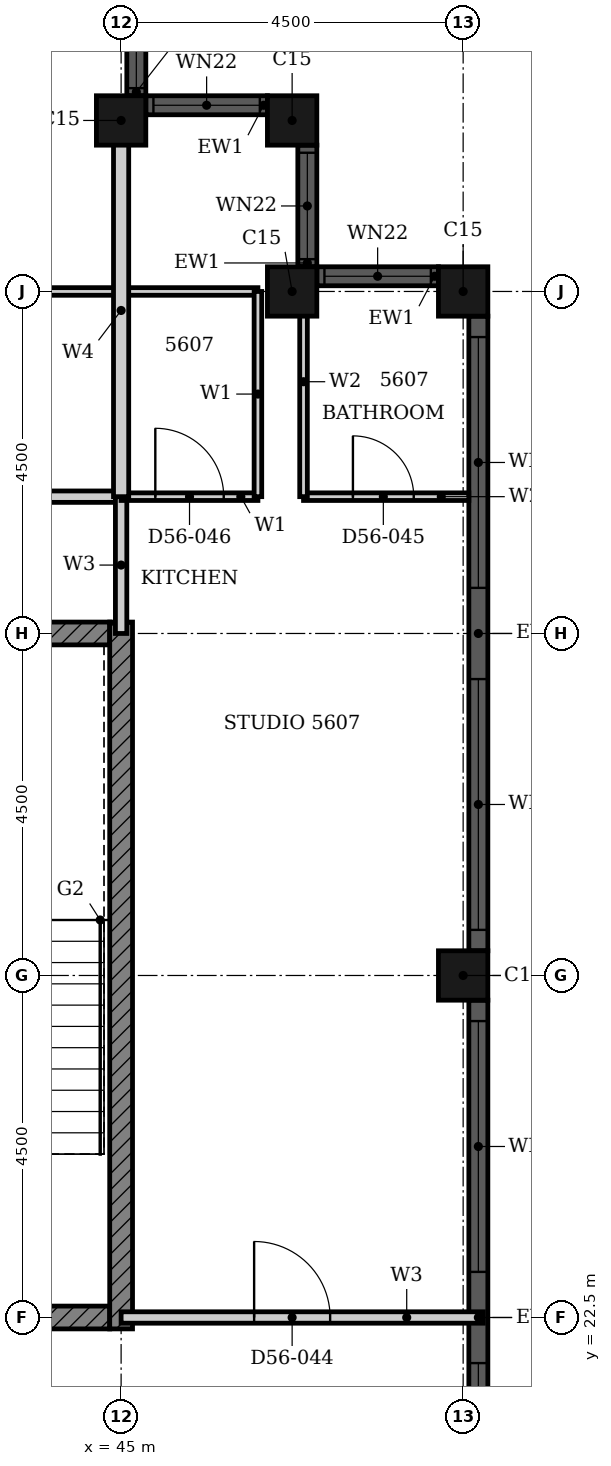
"""IFC4 building model, lengths in metres.
Left out: names, types, materials, properties, quantities, classifications, styles, units other than length and angle.
Written with IfcOpenShell. Run it as: python <this file> out.ifc"""

import sys

from ifc_helpers import new_model, si_unit, direction, frame, frame_2d, origin, origin_2d, place, context, subcontext, project, spatial, rectangle, hollow_rectangle, extrude, element, fill, save


model = new_model("IFC4")
c1 = context("Model", 3, precision=1e-05, world=origin(), true_north=direction((0.0, 1.0)))
c2 = subcontext(c1, "Body", "Model", "MODEL_VIEW")
j1 = project(units=[si_unit("LENGTHUNIT", "METRE"), si_unit("PLANEANGLEUNIT", "RADIAN")], contexts=[c1])
p1 = place(None, origin())
s1 = spatial("IfcSite", under=j1, at=p1, CompositionType="ELEMENT")
p2 = place(p1, origin())
s2 = spatial("IfcBuilding", under=s1, at=p2, CompositionType="ELEMENT")
p3 = place(p2, frame((0.0, 0.0, 222.0)))
s3 = spatial("IfcBuildingStorey", under=s2, at=p3, CompositionType="ELEMENT", Elevation=222.0)
for number, where, z_axis, x_axis in (
    (1, (49.5, 27.0, 0.0), (0.0, 0.0, 1.0), (1.0, 0.0, 0.0)),
    (2, (49.5, 36.0, 0.0), (0.0, 0.0, 1.0), (1.0, 0.0, 0.0)),
    (3, (47.25, 36.0, 0.0), (0.0, 0.0, 1.0), (1.0, 0.0, 0.0)),
    (4, (47.25, 38.25, 0.0), (0.0, 0.0, 1.0), (1.0, 0.0, 0.0)),
    (5, (45.0, 38.25, 0.0), (0.0, 0.0, 1.0), (1.0, 0.0, 0.0)),
):
    element("IfcColumn", number, at=place(p3, frame(where, z_axis=z_axis, x_axis=x_axis)), inside=s3, PredefinedType="COLUMN", context=c2, shape_type="SweptSolid", body=[
        extrude(hollow_rectangle(XDim=0.65, YDim=0.65, WallThickness=0.021, at=origin_2d()), origin(), (0.0, 0.0, 1.0), 3.7),
    ])
p4 = place(p3, frame((49.7, 18.325, 0.0), z_axis=(0.0, 0.0, 1.0), x_axis=(0.0, 1.0, 0.0)))
e6 = element("IfcWall", 6, at=p4, inside=s3, PredefinedType="SOLIDWALL", context=c2, shape_type="SweptSolid", body=[
    extrude(rectangle(XDim=8.35, YDim=0.25, at=frame_2d((4.175, 0.0))), origin(), (0.0, 0.0, 1.0), 3.7),
])
p5 = place(p4, frame((0.275, 0.0, 0.45)))
e7 = element("IfcOpeningElement", 7, at=p5, cuts=e6, PredefinedType="OPENING", context=c2, shape_type="SweptSolid", body=[
    extrude(rectangle(XDim=3.3, YDim=2.3, at=frame_2d((1.65, 1.15))), frame((0.0, 0.135, 0.0), z_axis=(0.0, -1.0, 0.0), x_axis=(1.0, 0.0, 0.0)), (0.0, 0.0, 1.0), 0.27),
])
p6 = place(p4, frame((4.775, 0.0, 0.45)))
e8 = element("IfcOpeningElement", 8, at=p6, cuts=e6, PredefinedType="OPENING", context=c2, shape_type="SweptSolid", body=[
    extrude(rectangle(XDim=3.3, YDim=2.3, at=frame_2d((1.65, 1.15))), frame((0.0, 0.135, 0.0), z_axis=(0.0, -1.0, 0.0), x_axis=(1.0, 0.0, 0.0)), (0.0, 0.0, 1.0), 0.27),
])
p7 = place(p3, frame((49.7, 27.325, 0.0), z_axis=(0.0, 0.0, 1.0), x_axis=(0.0, 1.0, 0.0)))
e9 = element("IfcWall", 9, at=p7, inside=s3, PredefinedType="SOLIDWALL", context=c2, shape_type="SweptSolid", body=[
    extrude(rectangle(XDim=8.35, YDim=0.25, at=frame_2d((4.175, 0.0))), origin(), (0.0, 0.0, 1.0), 3.7),
])
p8 = place(p7, frame((0.275, 0.0, 0.45)))
e10 = element("IfcOpeningElement", 10, at=p8, cuts=e9, PredefinedType="OPENING", context=c2, shape_type="SweptSolid", body=[
    extrude(rectangle(XDim=3.3, YDim=2.3, at=frame_2d((1.65, 1.15))), frame((0.0, 0.135, 0.0), z_axis=(0.0, -1.0, 0.0), x_axis=(1.0, 0.0, 0.0)), (0.0, 0.0, 1.0), 0.27),
])
p9 = place(p7, frame((4.775, 0.0, 0.45)))
e11 = element("IfcOpeningElement", 11, at=p9, cuts=e9, PredefinedType="OPENING", context=c2, shape_type="SweptSolid", body=[
    extrude(rectangle(XDim=3.3, YDim=2.3, at=frame_2d((1.65, 1.15))), frame((0.0, 0.135, 0.0), z_axis=(0.0, -1.0, 0.0), x_axis=(1.0, 0.0, 0.0)), (0.0, 0.0, 1.0), 0.27),
])
p10 = place(p3, frame((49.175, 36.2, 0.0), z_axis=(0.0, 0.0, 1.0), x_axis=(-1.0, 0.0, 0.0)))
e12 = element("IfcWall", 12, at=p10, inside=s3, PredefinedType="SOLIDWALL", context=c2, shape_type="SweptSolid", body=[
    extrude(rectangle(XDim=1.6, YDim=0.25, at=frame_2d((0.8, 0.0))), origin(), (0.0, 0.0, 1.0), 3.7),
])
p11 = place(p10, frame((0.1, 0.0, 0.9)))
e13 = element("IfcOpeningElement", 13, at=p11, cuts=e12, PredefinedType="OPENING", context=c2, shape_type="SweptSolid", body=[
    extrude(rectangle(XDim=1.4, YDim=1.85, at=frame_2d((0.7, 0.925))), frame((0.0, 0.135, 0.0), z_axis=(0.0, -1.0, 0.0), x_axis=(1.0, 0.0, 0.0)), (0.0, 0.0, 1.0), 0.27),
])
p12 = place(p3, frame((47.45, 36.325, 0.0), z_axis=(0.0, 0.0, 1.0), x_axis=(0.0, 1.0, 0.0)))
e14 = element("IfcWall", 14, at=p12, inside=s3, PredefinedType="SOLIDWALL", context=c2, shape_type="SweptSolid", body=[
    extrude(rectangle(XDim=1.6, YDim=0.25, at=frame_2d((0.8, 0.0))), origin(), (0.0, 0.0, 1.0), 3.7),
])
p13 = place(p12, frame((0.1, 0.0, 0.9)))
e15 = element("IfcOpeningElement", 15, at=p13, cuts=e14, PredefinedType="OPENING", context=c2, shape_type="SweptSolid", body=[
    extrude(rectangle(XDim=1.4, YDim=1.85, at=frame_2d((0.7, 0.925))), frame((0.0, 0.135, 0.0), z_axis=(0.0, -1.0, 0.0), x_axis=(1.0, 0.0, 0.0)), (0.0, 0.0, 1.0), 0.27),
])
p14 = place(p3, frame((46.925, 38.45, 0.0), z_axis=(0.0, 0.0, 1.0), x_axis=(-1.0, 0.0, 0.0)))
e16 = element("IfcWall", 16, at=p14, inside=s3, PredefinedType="SOLIDWALL", context=c2, shape_type="SweptSolid", body=[
    extrude(rectangle(XDim=1.6, YDim=0.25, at=frame_2d((0.8, 0.0))), origin(), (0.0, 0.0, 1.0), 3.7),
])
p15 = place(p14, frame((0.1, 0.0, 0.9)))
e17 = element("IfcOpeningElement", 17, at=p15, cuts=e16, PredefinedType="OPENING", context=c2, shape_type="SweptSolid", body=[
    extrude(rectangle(XDim=1.4, YDim=1.85, at=frame_2d((0.7, 0.925))), frame((0.0, 0.135, 0.0), z_axis=(0.0, -1.0, 0.0), x_axis=(1.0, 0.0, 0.0)), (0.0, 0.0, 1.0), 0.27),
])
p16 = place(p3, frame((45.2, 38.575, 0.0), z_axis=(0.0, 0.0, 1.0), x_axis=(0.0, 1.0, 0.0)))
e18 = element("IfcWall", 18, at=p16, inside=s3, PredefinedType="SOLIDWALL", context=c2, shape_type="SweptSolid", body=[
    extrude(rectangle(XDim=1.6, YDim=0.25, at=frame_2d((0.8, 0.0))), origin(), (0.0, 0.0, 1.0), 3.7),
])
p17 = place(p16, frame((0.1, 0.0, 0.9)))
e19 = element("IfcOpeningElement", 19, at=p17, cuts=e18, PredefinedType="OPENING", context=c2, shape_type="SweptSolid", body=[
    extrude(rectangle(XDim=1.4, YDim=1.85, at=frame_2d((0.7, 0.925))), frame((0.0, 0.135, 0.0), z_axis=(0.0, -1.0, 0.0), x_axis=(1.0, 0.0, 0.0)), (0.0, 0.0, 1.0), 0.27),
])
p18 = place(p3, frame((32.911, 22.5, 0.0), z_axis=(0.0, 0.0, 1.0), x_axis=(1.0, 0.0, 0.0)))
e20 = element("IfcWall", 20, at=p18, inside=s3, PredefinedType="SHEAR", context=c2, shape_type="SweptSolid", body=[
    extrude(rectangle(XDim=11.939, YDim=0.3, at=frame_2d((5.97, 0.0))), origin(), (0.0, 0.0, 1.0), 3.4),
])
p19 = place(p18, frame((5.404, 0.0, 0.0)))
e21 = element("IfcOpeningElement", 21, at=p19, cuts=e20, PredefinedType="OPENING", context=c2, shape_type="SweptSolid", body=[
    extrude(rectangle(XDim=1.8, YDim=2.1, at=frame_2d((0.9, 1.05))), frame((0.0, 0.16, 0.0), z_axis=(0.0, -1.0, 0.0), x_axis=(1.0, 0.0, 0.0)), (0.0, 0.0, 1.0), 0.32),
])
p20 = place(p3, frame((40.625, 31.5, 0.0), z_axis=(0.0, 0.0, 1.0), x_axis=(1.0, 0.0, 0.0)))
e22 = element("IfcWall", 22, at=p20, inside=s3, PredefinedType="SHEAR", context=c2, shape_type="SweptSolid", body=[
    extrude(rectangle(XDim=4.225, YDim=0.3, at=frame_2d((2.113, 0.0))), origin(), (0.0, 0.0, 1.0), 3.4),
])
p21 = place(p3, frame((45.0, 22.35, 0.0), z_axis=(0.0, 0.0, 1.0), x_axis=(0.0, 1.0, 0.0)))
e23 = element("IfcWall", 23, at=p21, inside=s3, PredefinedType="SHEAR", context=c2, shape_type="SweptSolid", body=[
    extrude(rectangle(XDim=9.3, YDim=0.3, at=frame_2d((4.65, 0.0))), origin(), (0.0, 0.0, 1.0), 3.4),
])
p22 = place(p3, frame((45.0, 22.5, 0.0), z_axis=(0.0, 0.0, 1.0), x_axis=(1.0, 0.0, 0.0)))
e24 = element("IfcWall", 24, at=p22, inside=s3, PredefinedType="PARTITIONING", context=c2, shape_type="SweptSolid", body=[
    extrude(rectangle(XDim=4.765, YDim=0.15, at=frame_2d((2.382, 0.0))), origin(), (0.0, 0.0, 1.0), 3.4),
])
p23 = place(p22, frame((1.75, 0.0, 0.0)))
e25 = element("IfcOpeningElement", 25, at=p23, cuts=e24, PredefinedType="OPENING", context=c2, shape_type="SweptSolid", body=[
    extrude(rectangle(XDim=1.0, YDim=2.2, at=frame_2d((0.5, 1.1))), frame((0.0, 0.085, 0.0), z_axis=(0.0, -1.0, 0.0), x_axis=(1.0, 0.0, 0.0)), (0.0, 0.0, 1.0), 0.17),
])
p24 = place(p3, frame((33.9, 33.3, 0.0), z_axis=(0.0, 0.0, 1.0), x_axis=(1.0, 0.0, 0.0)))
e26 = element("IfcWall", 26, at=p24, inside=s3, PredefinedType="PARTITIONING", context=c2, shape_type="SweptSolid", body=[
    extrude(rectangle(XDim=11.1, YDim=0.15, at=frame_2d((5.55, 0.0))), origin(), (0.0, 0.0, 1.0), 3.4),
])
p25 = place(p24, frame((1.6, 0.0, 0.0)))
e27 = element("IfcOpeningElement", 27, at=p25, cuts=e26, PredefinedType="OPENING", context=c2, shape_type="SweptSolid", body=[
    extrude(rectangle(XDim=1.0, YDim=2.2, at=frame_2d((0.5, 1.1))), frame((0.0, 0.085, 0.0), z_axis=(0.0, -1.0, 0.0), x_axis=(1.0, 0.0, 0.0)), (0.0, 0.0, 1.0), 0.17),
])
p26 = place(p3, frame((45.0, 31.5, 0.0), z_axis=(0.0, 0.0, 1.0), x_axis=(0.0, 1.0, 0.0)))
e28 = element("IfcWall", 28, at=p26, inside=s3, PredefinedType="PARTITIONING", context=c2, shape_type="SweptSolid", body=[
    extrude(rectangle(XDim=1.8, YDim=0.15, at=frame_2d((0.9, 0.0))), origin(), (0.0, 0.0, 1.0), 3.4),
])
p27 = place(p3, frame((45.0, 33.3, 0.0), z_axis=(0.0, 0.0, 1.0), x_axis=(1.0, 0.0, 0.0)))
e29 = element("IfcWall", 29, at=p27, inside=s3, PredefinedType="PARTITIONING", context=c2, shape_type="SweptSolid", body=[
    extrude(rectangle(XDim=1.8, YDim=0.1, at=frame_2d((0.9, 0.0))), origin(), (0.0, 0.0, 1.0), 3.4),
])
p28 = place(p27, frame((0.45, 0.0, 0.0)))
e30 = element("IfcOpeningElement", 30, at=p28, cuts=e29, PredefinedType="OPENING", context=c2, shape_type="SweptSolid", body=[
    extrude(rectangle(XDim=0.9, YDim=2.1, at=frame_2d((0.45, 1.05))), frame((0.0, 0.06, 0.0), z_axis=(0.0, -1.0, 0.0), x_axis=(1.0, 0.0, 0.0)), (0.0, 0.0, 1.0), 0.12),
])
p29 = place(p3, frame((38.1, 36.0, 0.0), z_axis=(0.0, 0.0, 1.0), x_axis=(1.0, 0.0, 0.0)))
e31 = element("IfcWall", 31, at=p29, inside=s3, PredefinedType="PARTITIONING", context=c2, shape_type="SweptSolid", body=[
    extrude(rectangle(XDim=8.7, YDim=0.1, at=frame_2d((4.35, 0.0))), origin(), (0.0, 0.0, 1.0), 3.4),
])
p30 = place(p29, frame((4.65, 0.0, 0.0)))
e32 = element("IfcOpeningElement", 32, at=p30, cuts=e31, PredefinedType="OPENING", context=c2, shape_type="SweptSolid", body=[
    extrude(rectangle(XDim=0.9, YDim=2.1, at=frame_2d((0.45, 1.05))), frame((0.0, 0.06, 0.0), z_axis=(0.0, -1.0, 0.0), x_axis=(1.0, 0.0, 0.0)), (0.0, 0.0, 1.0), 0.12),
])
p31 = place(p3, frame((46.8, 33.3, 0.0), z_axis=(0.0, 0.0, 1.0), x_axis=(0.0, 1.0, 0.0)))
e33 = element("IfcWall", 33, at=p31, inside=s3, PredefinedType="PARTITIONING", context=c2, shape_type="SweptSolid", body=[
    extrude(rectangle(XDim=2.7, YDim=0.1, at=frame_2d((1.35, 0.0))), origin(), (0.0, 0.0, 1.0), 3.4),
])
p32 = place(p3, frame((45.0, 33.3, 0.0), z_axis=(0.0, 0.0, 1.0), x_axis=(0.0, 1.0, 0.0)))
e34 = element("IfcWall", 34, at=p32, inside=s3, PredefinedType="PARTITIONING", context=c2, shape_type="SweptSolid", body=[
    extrude(rectangle(XDim=4.9, YDim=0.2, at=frame_2d((2.45, 0.0))), origin(), (0.0, 0.0, 1.0), 3.4),
])
p33 = place(p3, frame((47.4, 33.3, 0.0), z_axis=(0.0, 0.0, 1.0), x_axis=(1.0, 0.0, 0.0)))
e35 = element("IfcWall", 35, at=p33, inside=s3, PredefinedType="PARTITIONING", context=c2, shape_type="SweptSolid", body=[
    extrude(rectangle(XDim=2.175, YDim=0.1, at=frame_2d((1.087, 0.0))), origin(), (0.0, 0.0, 1.0), 3.4),
])
p34 = place(p33, frame((0.65, 0.0, 0.0)))
e36 = element("IfcOpeningElement", 36, at=p34, cuts=e35, PredefinedType="OPENING", context=c2, shape_type="SweptSolid", body=[
    extrude(rectangle(XDim=0.8, YDim=2.1, at=frame_2d((0.4, 1.05))), frame((0.0, 0.06, 0.0), z_axis=(0.0, -1.0, 0.0), x_axis=(1.0, 0.0, 0.0)), (0.0, 0.0, 1.0), 0.12),
])
p35 = place(p3, frame((47.4, 33.3, 0.0), z_axis=(0.0, 0.0, 1.0), x_axis=(0.0, 1.0, 0.0)))
e37 = element("IfcWall", 37, at=p35, inside=s3, PredefinedType="PARTITIONING", context=c2, shape_type="SweptSolid", body=[
    extrude(rectangle(XDim=3.025, YDim=0.1, at=frame_2d((1.512, 0.0))), origin(), (0.0, 0.0, 1.0), 3.4),
])
p36 = place(p5, origin())
e38 = element("IfcWindow", 38, at=p36, inside=s3, PartitioningType="SINGLE_PANEL", PredefinedType="WINDOW", context=c2, shape_type="SweptSolid", body=[
    extrude(rectangle(XDim=3.3, YDim=2.3, at=frame_2d((1.65, 1.15))), frame((0.0, 0.03, 0.0), z_axis=(0.0, -1.0, 0.0), x_axis=(1.0, 0.0, 0.0)), (0.0, 0.0, 1.0), 0.06),
])
fill(e7, e38)
p37 = place(p6, origin())
e39 = element("IfcWindow", 39, at=p37, inside=s3, PartitioningType="SINGLE_PANEL", PredefinedType="WINDOW", context=c2, shape_type="SweptSolid", body=[
    extrude(rectangle(XDim=3.3, YDim=2.3, at=frame_2d((1.65, 1.15))), frame((0.0, 0.03, 0.0), z_axis=(0.0, -1.0, 0.0), x_axis=(1.0, 0.0, 0.0)), (0.0, 0.0, 1.0), 0.06),
])
fill(e8, e39)
p38 = place(p8, origin())
e40 = element("IfcWindow", 40, at=p38, inside=s3, PartitioningType="SINGLE_PANEL", PredefinedType="WINDOW", context=c2, shape_type="SweptSolid", body=[
    extrude(rectangle(XDim=3.3, YDim=2.3, at=frame_2d((1.65, 1.15))), frame((0.0, 0.03, 0.0), z_axis=(0.0, -1.0, 0.0), x_axis=(1.0, 0.0, 0.0)), (0.0, 0.0, 1.0), 0.06),
])
fill(e10, e40)
p39 = place(p9, origin())
e41 = element("IfcWindow", 41, at=p39, inside=s3, PartitioningType="SINGLE_PANEL", PredefinedType="WINDOW", context=c2, shape_type="SweptSolid", body=[
    extrude(rectangle(XDim=3.3, YDim=2.3, at=frame_2d((1.65, 1.15))), frame((0.0, 0.03, 0.0), z_axis=(0.0, -1.0, 0.0), x_axis=(1.0, 0.0, 0.0)), (0.0, 0.0, 1.0), 0.06),
])
fill(e11, e41)
p40 = place(p11, origin())
e42 = element("IfcWindow", 42, at=p40, inside=s3, PartitioningType="SINGLE_PANEL", PredefinedType="WINDOW", context=c2, shape_type="SweptSolid", body=[
    extrude(rectangle(XDim=1.4, YDim=1.85, at=frame_2d((0.7, 0.925))), frame((0.0, 0.03, 0.0), z_axis=(0.0, -1.0, 0.0), x_axis=(1.0, 0.0, 0.0)), (0.0, 0.0, 1.0), 0.06),
])
fill(e13, e42)
p41 = place(p13, origin())
e43 = element("IfcWindow", 43, at=p41, inside=s3, PartitioningType="SINGLE_PANEL", PredefinedType="WINDOW", context=c2, shape_type="SweptSolid", body=[
    extrude(rectangle(XDim=1.4, YDim=1.85, at=frame_2d((0.7, 0.925))), frame((0.0, 0.03, 0.0), z_axis=(0.0, -1.0, 0.0), x_axis=(1.0, 0.0, 0.0)), (0.0, 0.0, 1.0), 0.06),
])
fill(e15, e43)
p42 = place(p15, origin())
e44 = element("IfcWindow", 44, at=p42, inside=s3, PartitioningType="SINGLE_PANEL", PredefinedType="WINDOW", context=c2, shape_type="SweptSolid", body=[
    extrude(rectangle(XDim=1.4, YDim=1.85, at=frame_2d((0.7, 0.925))), frame((0.0, 0.03, 0.0), z_axis=(0.0, -1.0, 0.0), x_axis=(1.0, 0.0, 0.0)), (0.0, 0.0, 1.0), 0.06),
])
fill(e17, e44)
p43 = place(p17, origin())
e45 = element("IfcWindow", 45, at=p43, inside=s3, PartitioningType="SINGLE_PANEL", PredefinedType="WINDOW", context=c2, shape_type="SweptSolid", body=[
    extrude(rectangle(XDim=1.4, YDim=1.85, at=frame_2d((0.7, 0.925))), frame((0.0, 0.03, 0.0), z_axis=(0.0, -1.0, 0.0), x_axis=(1.0, 0.0, 0.0)), (0.0, 0.0, 1.0), 0.06),
])
fill(e19, e45)
p44 = place(p23, origin())
e46 = element("IfcDoor", 46, at=p44, inside=s3, OperationType="SINGLE_SWING_RIGHT", PredefinedType="DOOR", context=c2, shape_type="SweptSolid", body=[
    extrude(rectangle(XDim=1.0, YDim=2.2, at=frame_2d((0.5, 1.1))), frame((0.0, 0.025, 0.0), z_axis=(0.0, -1.0, 0.0), x_axis=(1.0, 0.0, 0.0)), (0.0, 0.0, 1.0), 0.05),
])
fill(e25, e46)
p45 = place(p34, origin())
e47 = element("IfcDoor", 47, at=p45, inside=s3, OperationType="SINGLE_SWING_RIGHT", PredefinedType="DOOR", context=c2, shape_type="SweptSolid", body=[
    extrude(rectangle(XDim=0.8, YDim=2.1, at=frame_2d((0.4, 1.05))), frame((0.0, 0.025, 0.0), z_axis=(0.0, -1.0, 0.0), x_axis=(1.0, 0.0, 0.0)), (0.0, 0.0, 1.0), 0.05),
])
fill(e36, e47)
p46 = place(p28, origin())
e48 = element("IfcDoor", 48, at=p46, inside=s3, OperationType="SINGLE_SWING_LEFT", PredefinedType="DOOR", context=c2, shape_type="SweptSolid", body=[
    extrude(rectangle(XDim=0.9, YDim=2.1, at=frame_2d((0.45, 1.05))), frame((0.0, 0.025, 0.0), z_axis=(0.0, -1.0, 0.0), x_axis=(1.0, 0.0, 0.0)), (0.0, 0.0, 1.0), 0.05),
])
fill(e30, e48)
save(model, sys.argv[1])
